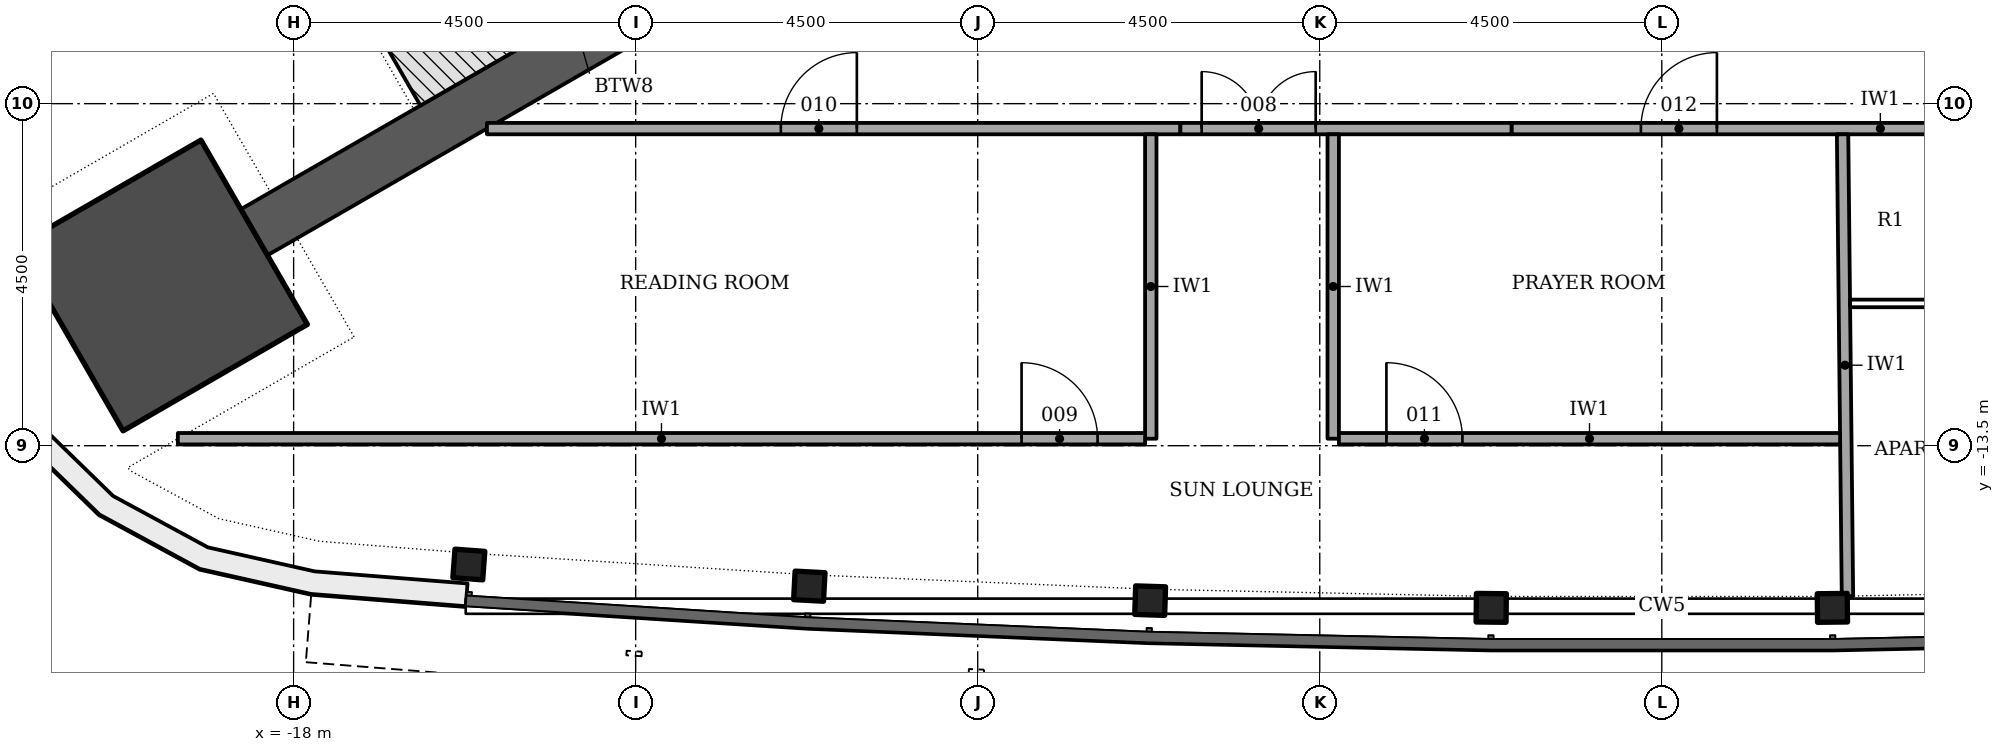
"""IFC4 building model, lengths in metres.
Left out: names, types, materials, properties, quantities, classifications, styles, units other than length and angle.
Written with IfcOpenShell. Run it as: python <this file> out.ifc"""

import sys

from ifc_helpers import new_model, si_unit, direction, frame, frame_2d, origin, origin_2d, place, context, subcontext, project, spatial, polyline, rectangle, i_section, outline, extrude, element, fill, save


model = new_model("IFC4")
c1 = context("Model", 3, precision=1e-05, world=origin(), true_north=direction((0.0, 1.0)))
c2 = subcontext(c1, "Body", "Model", "MODEL_VIEW")
j1 = project(units=[si_unit("LENGTHUNIT", "METRE"), si_unit("PLANEANGLEUNIT", "RADIAN")], contexts=[c1])
p1 = place(None, origin())
s1 = spatial("IfcSite", under=j1, at=p1, CompositionType="ELEMENT")
p2 = place(p1, origin())
s2 = spatial("IfcBuilding", under=s1, at=p2, CompositionType="ELEMENT")
p3 = place(p2, frame((0.0, 0.0, 174.3)))
s3 = spatial("IfcBuildingStorey", under=s2, at=p3, CompositionType="ELEMENT", Elevation=174.3)
p4 = place(p3, frame((-9.922, -5.728, -0.2), z_axis=(0.0, 0.0, 1.0), x_axis=(-0.866029553954, -0.499992811627, 0.0)))
e1 = element("IfcWall", 1, at=p4, inside=s3, PredefinedType="SHEAR", context=c2, shape_type="SweptSolid", body=[
    extrude(rectangle(XDim=9.927, YDim=0.7, at=frame_2d((4.964, 0.0))), origin(), (0.0, 0.0, 1.0), 3.6),
])
p5 = place(p3, frame((-19.731, -11.392, -0.2), z_axis=(0.0, 0.0, 1.0), x_axis=(-0.866025403784, -0.5, 0.0)))
e2 = element("IfcColumn", 2, at=p5, inside=s3, PredefinedType="COLUMN", context=c2, shape_type="SweptSolid", body=[
    extrude(rectangle(XDim=2.8, YDim=2.8, at=origin_2d()), origin(), (0.0, 0.0, 1.0), 3.6),
])
for number, where, z_axis, x_axis in (
    (3, (-15.695, -15.063, -0.2), (0.0, 0.0, 1.0), (0.997, -0.074, 0.0)),
    (4, (-11.216, -15.348, -0.2), (0.0, 0.0, 1.0), (0.999, -0.053, 0.0)),
    (5, (-6.731, -15.538, -0.2), (0.0, 0.0, 1.0), (0.999, -0.032, 0.0)),
    (6, (-2.244, -15.633, -0.2), (0.0, 0.0, 1.0), (1.0, -0.011, 0.0)),
    (7, (2.244, -15.633, -0.2), (0.0, 0.0, 1.0), (1.0, 0.011, 0.0)),
):
    element("IfcColumn", number, at=place(p3, frame(where, z_axis=z_axis, x_axis=x_axis)), inside=s3, PredefinedType="COLUMN", context=c2, shape_type="SweptSolid", body=[
        extrude(i_section(OverallWidth=0.394, OverallDepth=0.376, WebThickness=0.017, FlangeThickness=0.028, FilletRadius=0.015, at=origin_2d()), origin(), (0.0, 0.0, 1.0), 3.6),
    ])
p6 = place(p3, origin())
e8 = element("IfcWall", 8, at=p6, inside=s3, PredefinedType="NOTDEFINED", context=c2, shape_type="SweptSolid", body=[
    extrude(outline(polyline([(-21.388, -5.822), (-22.265, -7.662), (-22.712, -9.097), (-22.753, -10.599), (-22.383, -12.055), (-21.632, -13.357), (-20.555, -14.405), (-19.234, -15.121), (-17.768, -15.451), (-15.736, -15.612), (-15.712, -15.312), (-17.723, -15.154), (-19.128, -14.837), (-20.376, -14.161), (-21.393, -13.171), (-22.103, -11.941), (-22.452, -10.565), (-22.413, -9.146), (-21.985, -7.772), (-21.117, -5.951), (-21.388, -5.822)])), origin(), (0.0, 0.0, 1.0), 3.3),
])
p7 = place(p3, frame((-10.406, -4.89, -0.2), z_axis=(0.0, 0.0, 1.0), x_axis=(-0.866018442252, -0.500012057535, 0.0)))
e9 = element("IfcWall", 9, at=p7, inside=s3, PredefinedType="SHEAR", context=c2, shape_type="SweptSolid", body=[
    extrude(rectangle(XDim=7.2, YDim=1.236, at=frame_2d((3.6, 0.0))), origin(), (0.0, 0.0, 1.0), 3.6),
])
p8 = place(p3, frame((-15.457, -9.328, 0.0), z_axis=(0.0, 0.0, 1.0), x_axis=(1.0, 0.0, 0.0)))
e10 = element("IfcWall", 10, at=p8, inside=s3, PredefinedType="PARTITIONING", context=c2, shape_type="SweptSolid", body=[
    extrude(rectangle(XDim=9.123, YDim=0.15, at=frame_2d((4.562, 0.0))), origin(), (0.0, 0.0, 1.0), 2.847),
])
p9 = place(p8, frame((3.867, 0.0, 0.0)))
e11 = element("IfcOpeningElement", 11, at=p9, cuts=e10, PredefinedType="OPENING", context=c2, shape_type="SweptSolid", body=[
    extrude(rectangle(XDim=1.0, YDim=2.1, at=frame_2d((0.5, 1.05))), frame((0.0, 0.085, 0.0), z_axis=(0.0, -1.0, 0.0), x_axis=(1.0, 0.0, 0.0)), (0.0, 0.0, 1.0), 0.17),
])
p10 = place(p3, frame((-1.977, -9.328, 0.0), z_axis=(0.0, 0.0, 1.0), x_axis=(1.0, 0.0, 0.0)))
e12 = element("IfcWall", 12, at=p10, inside=s3, PredefinedType="PARTITIONING", context=c2, shape_type="SweptSolid", body=[
    extrude(rectangle(XDim=9.705, YDim=0.15, at=frame_2d((4.853, 0.0))), origin(), (0.0, 0.0, 1.0), 2.847),
])
p11 = place(p10, frame((1.702, 0.0, 0.0)))
e13 = element("IfcOpeningElement", 13, at=p11, cuts=e12, PredefinedType="OPENING", context=c2, shape_type="SweptSolid", body=[
    extrude(rectangle(XDim=1.0, YDim=2.1, at=frame_2d((0.5, 1.05))), frame((0.0, 0.085, 0.0), z_axis=(0.0, -1.0, 0.0), x_axis=(1.0, 0.0, 0.0)), (0.0, 0.0, 1.0), 0.17),
])
p12 = place(p10, frame((7.592, 0.0, 0.0)))
e14 = element("IfcOpeningElement", 14, at=p12, cuts=e12, PredefinedType="OPENING", context=c2, shape_type="SweptSolid", body=[
    extrude(rectangle(XDim=1.0, YDim=2.1, at=frame_2d((0.5, 1.05))), frame((0.0, 0.085, 0.0), z_axis=(0.0, -1.0, 0.0), x_axis=(1.0, 0.0, 0.0)), (0.0, 0.0, 1.0), 0.17),
])
p13 = place(p3, frame((-6.334, -9.328, 0.0), z_axis=(0.0, 0.0, 1.0), x_axis=(1.0, 0.0, 0.0)))
e15 = element("IfcWall", 15, at=p13, inside=s3, PredefinedType="PARTITIONING", context=c2, shape_type="SweptSolid", body=[
    extrude(rectangle(XDim=4.357, YDim=0.15, at=frame_2d((2.178, 0.0))), origin(), (0.0, 0.0, 1.0), 2.847),
])
p14 = place(p13, frame((0.281, 0.0, 0.0)))
e16 = element("IfcOpeningElement", 16, at=p14, cuts=e15, PredefinedType="OPENING", context=c2, shape_type="SweptSolid", body=[
    extrude(rectangle(XDim=1.5, YDim=2.1, at=frame_2d((0.75, 1.05))), frame((0.0, 0.085, 0.0), z_axis=(0.0, -1.0, 0.0), x_axis=(1.0, 0.0, 0.0)), (0.0, 0.0, 1.0), 0.17),
])
p15 = place(p3, frame((2.443, -15.479, 0.0), z_axis=(0.0, 0.0, 1.0), x_axis=(-0.010607777316, 0.999943735947, 0.0)))
e17 = element("IfcWall", 17, at=p15, inside=s3, PredefinedType="PARTITIONING", context=c2, shape_type="SweptSolid", body=[
    extrude(rectangle(XDim=6.076, YDim=0.15, at=frame_2d((3.038, 0.0))), origin(), (0.0, 0.0, 1.0), 3.4),
])
p16 = place(p3, frame((-6.723, -9.403, 0.0), z_axis=(0.0, 0.0, 1.0), x_axis=(0.0, -1.0, 0.0)))
e18 = element("IfcWall", 18, at=p16, inside=s3, PredefinedType="PARTITIONING", context=c2, shape_type="SweptSolid", body=[
    extrude(rectangle(XDim=4.005, YDim=0.15, at=frame_2d((2.002, 0.0))), origin(), (0.0, 0.0, 1.0), 2.847),
])
p17 = place(p3, frame((-4.323, -9.403, 0.0), z_axis=(0.0, 0.0, 1.0), x_axis=(0.0, -1.0, 0.0)))
e19 = element("IfcWall", 19, at=p17, inside=s3, PredefinedType="PARTITIONING", context=c2, shape_type="SweptSolid", body=[
    extrude(rectangle(XDim=4.005, YDim=0.15, at=frame_2d((2.002, 0.0))), origin(), (0.0, 0.0, 1.0), 3.4),
])
p18 = place(p3, frame((-19.523, -13.408, 0.0), z_axis=(0.0, 0.0, 1.0), x_axis=(1.0, 0.0, 0.0)))
e20 = element("IfcWall", 20, at=p18, inside=s3, PredefinedType="PARTITIONING", context=c2, shape_type="SweptSolid", body=[
    extrude(rectangle(XDim=12.725, YDim=0.15, at=frame_2d((6.363, 0.0))), origin(), (0.0, 0.0, 1.0), 2.847),
])
p19 = place(p18, frame((11.1, 0.0, 0.0)))
e21 = element("IfcOpeningElement", 21, at=p19, cuts=e20, PredefinedType="OPENING", context=c2, shape_type="SweptSolid", body=[
    extrude(rectangle(XDim=1.0, YDim=2.1, at=frame_2d((0.5, 1.05))), frame((0.0, 0.085, 0.0), z_axis=(0.0, -1.0, 0.0), x_axis=(1.0, 0.0, 0.0)), (0.0, 0.0, 1.0), 0.17),
])
p20 = place(p3, frame((-4.248, -13.408, 0.0), z_axis=(0.0, 0.0, 1.0), x_axis=(1.0, 0.0, 0.0)))
e22 = element("IfcWall", 22, at=p20, inside=s3, PredefinedType="PARTITIONING", context=c2, shape_type="SweptSolid", body=[
    extrude(rectangle(XDim=6.594, YDim=0.15, at=frame_2d((3.297, 0.0))), origin(), (0.0, 0.0, 1.0), 2.847),
])
p21 = place(p20, frame((0.625, 0.0, 0.0)))
e23 = element("IfcOpeningElement", 23, at=p21, cuts=e22, PredefinedType="OPENING", context=c2, shape_type="SweptSolid", body=[
    extrude(rectangle(XDim=1.0, YDim=2.1, at=frame_2d((0.5, 1.05))), frame((0.0, 0.085, 0.0), z_axis=(0.0, -1.0, 0.0), x_axis=(1.0, 0.0, 0.0)), (0.0, 0.0, 1.0), 0.17),
])
p22 = place(p3, frame((2.477, -11.628, 0.0), z_axis=(0.0, 0.0, 1.0), x_axis=(1.0, 0.0, 0.0)))
e24 = element("IfcWall", 24, at=p22, inside=s3, PredefinedType="PARTITIONING", context=c2, shape_type="SweptSolid", body=[
    extrude(rectangle(XDim=2.025, YDim=0.1, at=frame_2d((1.012, 0.0))), origin(), (0.0, 0.0, 1.0), 3.4),
])
p23 = place(p14, origin())
e25 = element("IfcDoor", 25, at=p23, inside=s3, OperationType="DOUBLE_DOOR_SINGLE_SWING", PredefinedType="DOOR", context=c2, shape_type="SweptSolid", body=[
    extrude(rectangle(XDim=1.5, YDim=2.1, at=frame_2d((0.75, 1.05))), frame((0.0, 0.025, 0.0), z_axis=(0.0, -1.0, 0.0), x_axis=(1.0, 0.0, 0.0)), (0.0, 0.0, 1.0), 0.05),
])
fill(e16, e25)
p24 = place(p19, origin())
e26 = element("IfcDoor", 26, at=p24, inside=s3, OperationType="SINGLE_SWING_LEFT", PredefinedType="DOOR", context=c2, shape_type="SweptSolid", body=[
    extrude(rectangle(XDim=1.0, YDim=2.1, at=frame_2d((0.5, 1.05))), frame((0.0, 0.025, 0.0), z_axis=(0.0, -1.0, 0.0), x_axis=(1.0, 0.0, 0.0)), (0.0, 0.0, 1.0), 0.05),
])
fill(e21, e26)
p25 = place(p9, origin())
e27 = element("IfcDoor", 27, at=p25, inside=s3, OperationType="SINGLE_SWING_RIGHT", PredefinedType="DOOR", context=c2, shape_type="SweptSolid", body=[
    extrude(rectangle(XDim=1.0, YDim=2.1, at=frame_2d((0.5, 1.05))), frame((0.0, 0.025, 0.0), z_axis=(0.0, -1.0, 0.0), x_axis=(1.0, 0.0, 0.0)), (0.0, 0.0, 1.0), 0.05),
])
fill(e11, e27)
p26 = place(p21, origin())
e28 = element("IfcDoor", 28, at=p26, inside=s3, OperationType="SINGLE_SWING_LEFT", PredefinedType="DOOR", context=c2, shape_type="SweptSolid", body=[
    extrude(rectangle(XDim=1.0, YDim=2.1, at=frame_2d((0.5, 1.05))), frame((0.0, 0.025, 0.0), z_axis=(0.0, -1.0, 0.0), x_axis=(1.0, 0.0, 0.0)), (0.0, 0.0, 1.0), 0.05),
])
fill(e23, e28)
p27 = place(p11, origin())
e29 = element("IfcDoor", 29, at=p27, inside=s3, OperationType="SINGLE_SWING_RIGHT", PredefinedType="DOOR", context=c2, shape_type="SweptSolid", body=[
    extrude(rectangle(XDim=1.0, YDim=2.1, at=frame_2d((0.5, 1.05))), frame((0.0, 0.025, 0.0), z_axis=(0.0, -1.0, 0.0), x_axis=(1.0, 0.0, 0.0)), (0.0, 0.0, 1.0), 0.05),
])
fill(e13, e29)
save(model, sys.argv[1])
